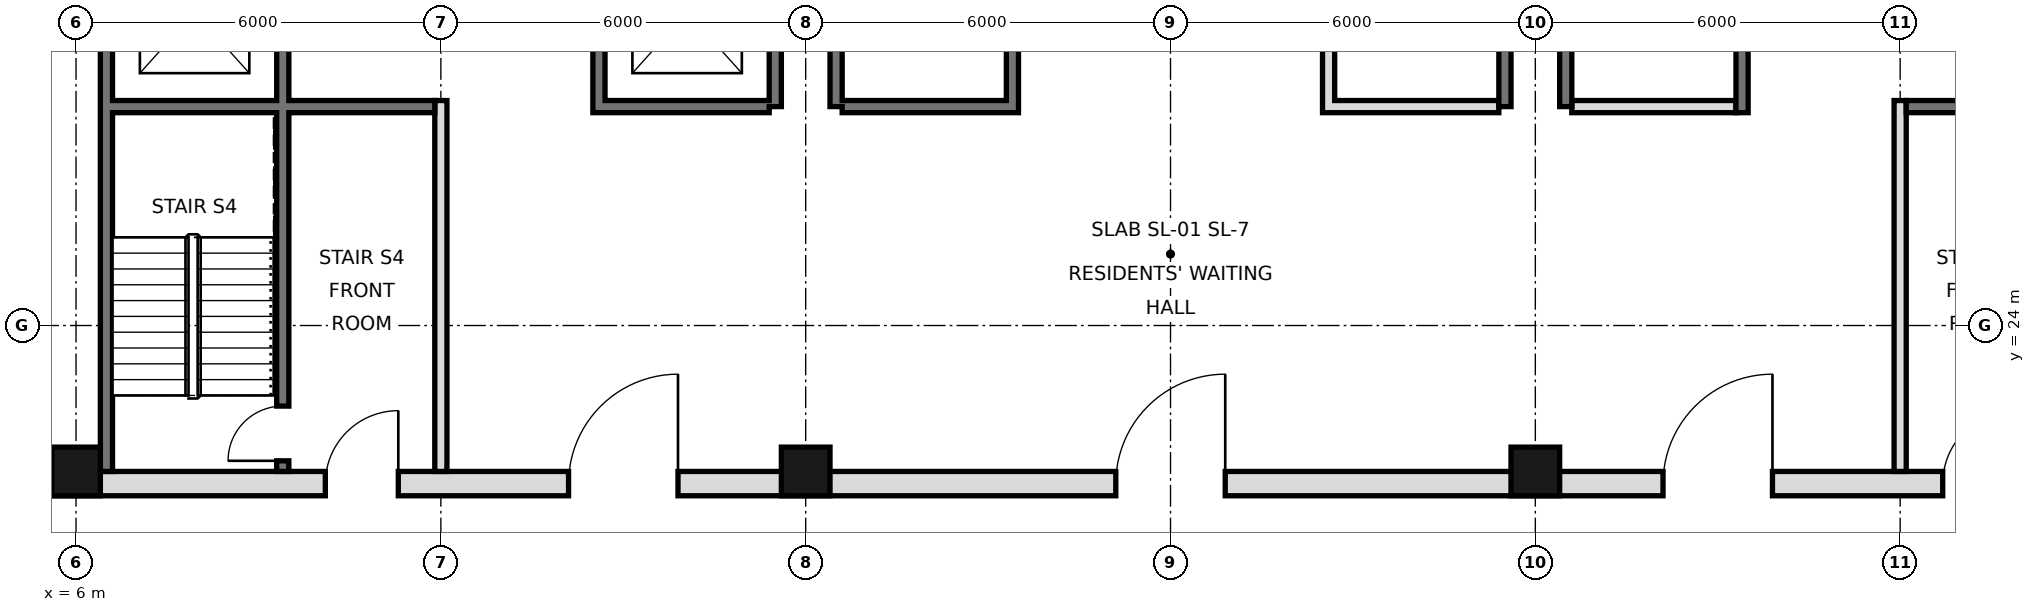
"""IFC4 building model, lengths in metres.
Left out: names, types, materials, properties, quantities, classifications, styles, units other than length and angle.
Written with IfcOpenShell. Run it as: python <this file> out.ifc"""

import sys

from ifc_helpers import new_model, si_unit, direction, frame, frame_2d, origin, origin_2d, place, context, subcontext, project, spatial, rectangle, hollow_rectangle, extrude, element, fill, save


model = new_model("IFC4")
c1 = context("Model", 3, precision=1e-05, world=origin(), true_north=direction((0.0, 1.0)))
c2 = subcontext(c1, "Body", "Model", "MODEL_VIEW")
j1 = project(units=[si_unit("LENGTHUNIT", "METRE"), si_unit("PLANEANGLEUNIT", "RADIAN")], contexts=[c1])
p1 = place(None, origin())
s1 = spatial("IfcSite", under=j1, at=p1, CompositionType="ELEMENT")
p2 = place(p1, origin())
s2 = spatial("IfcBuilding", under=s1, at=p2, CompositionType="ELEMENT")
p3 = place(p2, frame((0.0, 0.0, 82.2)))
s3 = spatial("IfcBuildingStorey", under=s2, at=p3, CompositionType="ELEMENT", Elevation=82.2)
for number, where, z_axis, x_axis in (
    (1, (6.0, 21.6, 0.0), (0.0, 0.0, 1.0), (1.0, 0.0, 0.0)),
    (2, (18.0, 21.6, 0.0), (0.0, 0.0, 1.0), (1.0, 0.0, 0.0)),
    (3, (30.0, 21.6, 0.0), (0.0, 0.0, 1.0), (1.0, 0.0, 0.0)),
):
    element("IfcColumn", number, at=place(p3, frame(where, z_axis=z_axis, x_axis=x_axis)), inside=s3, PredefinedType="COLUMN", context=c2, shape_type="SweptSolid", body=[
        extrude(hollow_rectangle(XDim=0.8, YDim=0.8, WallThickness=0.06, at=origin_2d()), origin(), (0.0, 0.0, 1.0), 3.6),
    ])
p4 = place(p3, frame((6.5, 21.6, 0.0), z_axis=(0.0, 0.0, 1.0), x_axis=(0.0, 1.0, 0.0)))
e4 = element("IfcWall", 4, at=p4, inside=s3, PredefinedType="SOLIDWALL", context=c2, shape_type="SweptSolid", body=[
    extrude(rectangle(XDim=23.5, YDim=0.2, at=frame_2d((11.75, 0.0))), origin(), (0.0, 0.0, 1.0), 3.42),
])
for number, where, z_axis, x_axis in (
    (5, (17.5, 27.6, 0.0), (0.0, 0.0, 1.0), (0.0, 1.0, 0.0)),
    (6, (18.5, 27.6, 0.0), (0.0, 0.0, 1.0), (0.0, 1.0, 0.0)),
    (7, (29.5, 27.6, 0.0), (0.0, 0.0, 1.0), (0.0, 1.0, 0.0)),
    (8, (30.5, 27.6, 0.0), (0.0, 0.0, 1.0), (0.0, 1.0, 0.0)),
):
    element("IfcWall", number, at=place(p3, frame(where, z_axis=z_axis, x_axis=x_axis)), inside=s3, PredefinedType="SOLIDWALL", context=c2, shape_type="SweptSolid", body=[
        extrude(rectangle(XDim=17.5, YDim=0.2, at=frame_2d((8.75, 0.0))), origin(), (0.0, 0.0, 1.0), 3.42),
    ])
p5 = place(p3, frame((5.6, 21.4, 0.0), z_axis=(0.0, 0.0, 1.0), x_axis=(1.0, 0.0, 0.0)))
e9 = element("IfcWall", 9, at=p5, inside=s3, PredefinedType="SOLIDWALL", context=c2, shape_type="SweptSolid", body=[
    extrude(rectangle(XDim=36.8, YDim=0.4, at=frame_2d((18.4, 0.0))), origin(), (0.0, 0.0, 1.0), 3.42),
])
p6 = place(p5, frame((8.5, 0.0, 0.0)))
e10 = element("IfcOpeningElement", 10, at=p6, cuts=e9, PredefinedType="OPENING", context=c2, shape_type="SweptSolid", body=[
    extrude(rectangle(XDim=1.8, YDim=2.1, at=frame_2d((0.9, 1.05))), frame((0.0, 0.21, 0.0), z_axis=(0.0, -1.0, 0.0), x_axis=(1.0, 0.0, 0.0)), (0.0, 0.0, 1.0), 0.42),
])
p7 = place(p5, frame((17.5, 0.0, 0.0)))
e11 = element("IfcOpeningElement", 11, at=p7, cuts=e9, PredefinedType="OPENING", context=c2, shape_type="SweptSolid", body=[
    extrude(rectangle(XDim=1.8, YDim=2.1, at=frame_2d((0.9, 1.05))), frame((0.0, 0.21, 0.0), z_axis=(0.0, -1.0, 0.0), x_axis=(1.0, 0.0, 0.0)), (0.0, 0.0, 1.0), 0.42),
])
p8 = place(p5, frame((26.5, 0.0, 0.0)))
e12 = element("IfcOpeningElement", 12, at=p8, cuts=e9, PredefinedType="OPENING", context=c2, shape_type="SweptSolid", body=[
    extrude(rectangle(XDim=1.8, YDim=2.1, at=frame_2d((0.9, 1.05))), frame((0.0, 0.21, 0.0), z_axis=(0.0, -1.0, 0.0), x_axis=(1.0, 0.0, 0.0)), (0.0, 0.0, 1.0), 0.42),
])
p9 = place(p5, frame((4.5, 0.0, 0.0)))
e13 = element("IfcOpeningElement", 13, at=p9, cuts=e9, PredefinedType="OPENING", context=c2, shape_type="SweptSolid", body=[
    extrude(rectangle(XDim=1.2, YDim=2.1, at=frame_2d((0.6, 1.05))), frame((0.0, 0.21, 0.0), z_axis=(0.0, -1.0, 0.0), x_axis=(1.0, 0.0, 0.0)), (0.0, 0.0, 1.0), 0.42),
])
p10 = place(p5, frame((31.1, 0.0, 0.0)))
e14 = element("IfcOpeningElement", 14, at=p10, cuts=e9, PredefinedType="OPENING", context=c2, shape_type="SweptSolid", body=[
    extrude(rectangle(XDim=1.2, YDim=2.1, at=frame_2d((0.6, 1.05))), frame((0.0, 0.21, 0.0), z_axis=(0.0, -1.0, 0.0), x_axis=(1.0, 0.0, 0.0)), (0.0, 0.0, 1.0), 0.42),
])
p11 = place(p3, frame((12.0, 21.6, 0.0), z_axis=(0.0, 0.0, 1.0), x_axis=(0.0, 1.0, 0.0)))
e15 = element("IfcWall", 15, at=p11, inside=s3, PredefinedType="PARTITIONING", context=c2, shape_type="SweptSolid", body=[
    extrude(rectangle(XDim=6.1, YDim=0.2, at=frame_2d((3.05, 0.0))), origin(), (0.0, 0.0, 1.0), 3.42),
])
p12 = place(p3, frame((14.6, 27.5, 0.0), z_axis=(0.0, 0.0, 1.0), x_axis=(0.0, 1.0, 0.0)))
e16 = element("IfcWall", 16, at=p12, inside=s3, PredefinedType="SOLIDWALL", context=c2, shape_type="SweptSolid", body=[
    extrude(rectangle(XDim=17.5, YDim=0.2, at=frame_2d((8.75, 0.0))), origin(), (0.0, 0.0, 1.0), 3.42),
])
p13 = place(p12, frame((1.1, 0.0, 0.0)))
e17 = element("IfcOpeningElement", 17, at=p13, cuts=e16, PredefinedType="OPENING", context=c2, shape_type="SweptSolid", body=[
    extrude(rectangle(XDim=1.1, YDim=2.1, at=frame_2d((0.55, 1.05))), frame((0.0, 0.11, 0.0), z_axis=(0.0, -1.0, 0.0), x_axis=(1.0, 0.0, 0.0)), (0.0, 0.0, 1.0), 0.22),
])
p14 = place(p12, frame((4.2, 0.0, 0.0)))
e18 = element("IfcOpeningElement", 18, at=p14, cuts=e16, PredefinedType="OPENING", context=c2, shape_type="SweptSolid", body=[
    extrude(rectangle(XDim=1.1, YDim=2.1, at=frame_2d((0.55, 1.05))), frame((0.0, 0.11, 0.0), z_axis=(0.0, -1.0, 0.0), x_axis=(1.0, 0.0, 0.0)), (0.0, 0.0, 1.0), 0.22),
])
p15 = place(p12, frame((15.4, 0.0, 0.0)))
e19 = element("IfcOpeningElement", 19, at=p15, cuts=e16, PredefinedType="OPENING", context=c2, shape_type="SweptSolid", body=[
    extrude(rectangle(XDim=1.1, YDim=2.1, at=frame_2d((0.55, 1.05))), frame((0.0, 0.11, 0.0), z_axis=(0.0, -1.0, 0.0), x_axis=(1.0, 0.0, 0.0)), (0.0, 0.0, 1.0), 0.22),
])
p16 = place(p12, frame((9.9, 0.0, 0.0)))
e20 = element("IfcOpeningElement", 20, at=p16, cuts=e16, PredefinedType="OPENING", context=c2, shape_type="SweptSolid", body=[
    extrude(rectangle(XDim=0.9, YDim=2.1, at=frame_2d((0.45, 1.05))), frame((0.0, 0.11, 0.0), z_axis=(0.0, -1.0, 0.0), x_axis=(1.0, 0.0, 0.0)), (0.0, 0.0, 1.0), 0.22),
])
p17 = place(p3, frame((21.4, 27.5, 0.0), z_axis=(0.0, 0.0, 1.0), x_axis=(0.0, 1.0, 0.0)))
e21 = element("IfcWall", 21, at=p17, inside=s3, PredefinedType="SOLIDWALL", context=c2, shape_type="SweptSolid", body=[
    extrude(rectangle(XDim=17.5, YDim=0.2, at=frame_2d((8.75, 0.0))), origin(), (0.0, 0.0, 1.0), 3.42),
])
p18 = place(p17, frame((9.8, 0.0, 0.0)))
e22 = element("IfcOpeningElement", 22, at=p18, cuts=e21, PredefinedType="OPENING", context=c2, shape_type="SweptSolid", body=[
    extrude(rectangle(XDim=1.0, YDim=2.1, at=frame_2d((0.5, 1.05))), frame((0.0, 0.11, 0.0), z_axis=(0.0, -1.0, 0.0), x_axis=(1.0, 0.0, 0.0)), (0.0, 0.0, 1.0), 0.22),
])
p19 = place(p17, frame((7.4, 0.0, 0.0)))
e23 = element("IfcOpeningElement", 23, at=p19, cuts=e21, PredefinedType="OPENING", context=c2, shape_type="SweptSolid", body=[
    extrude(rectangle(XDim=0.9, YDim=2.1, at=frame_2d((0.45, 1.05))), frame((0.0, 0.11, 0.0), z_axis=(0.0, -1.0, 0.0), x_axis=(1.0, 0.0, 0.0)), (0.0, 0.0, 1.0), 0.22),
])
p20 = place(p3, frame((26.6, 27.5, 0.0), z_axis=(0.0, 0.0, 1.0), x_axis=(0.0, 1.0, 0.0)))
e24 = element("IfcWall", 24, at=p20, inside=s3, PredefinedType="SOLIDWALL", context=c2, shape_type="SweptSolid", body=[
    extrude(rectangle(XDim=17.5, YDim=0.2, at=frame_2d((8.75, 0.0))), origin(), (0.0, 0.0, 1.0), 3.42),
])
p21 = place(p20, frame((4.3, 0.0, 0.0)))
e25 = element("IfcOpeningElement", 25, at=p21, cuts=e24, PredefinedType="OPENING", context=c2, shape_type="SweptSolid", body=[
    extrude(rectangle(XDim=0.9, YDim=2.1, at=frame_2d((0.45, 1.05))), frame((0.0, 0.11, 0.0), z_axis=(0.0, -1.0, 0.0), x_axis=(1.0, 0.0, 0.0)), (0.0, 0.0, 1.0), 0.22),
])
p22 = place(p20, frame((10.35, 0.0, 0.0)))
e26 = element("IfcOpeningElement", 26, at=p22, cuts=e24, PredefinedType="OPENING", context=c2, shape_type="SweptSolid", body=[
    extrude(rectangle(XDim=1.0, YDim=2.1, at=frame_2d((0.5, 1.05))), frame((0.0, 0.11, 0.0), z_axis=(0.0, -1.0, 0.0), x_axis=(1.0, 0.0, 0.0)), (0.0, 0.0, 1.0), 0.22),
])
p23 = place(p20, frame((14.575, 0.0, 0.0)))
e27 = element("IfcOpeningElement", 27, at=p23, cuts=e24, PredefinedType="OPENING", context=c2, shape_type="SweptSolid", body=[
    extrude(rectangle(XDim=1.0, YDim=2.1, at=frame_2d((0.5, 1.05))), frame((0.0, 0.11, 0.0), z_axis=(0.0, -1.0, 0.0), x_axis=(1.0, 0.0, 0.0)), (0.0, 0.0, 1.0), 0.22),
])
p24 = place(p3, frame((33.4, 27.5, 0.0), z_axis=(0.0, 0.0, 1.0), x_axis=(0.0, 1.0, 0.0)))
e28 = element("IfcWall", 28, at=p24, inside=s3, PredefinedType="SOLIDWALL", context=c2, shape_type="SweptSolid", body=[
    extrude(rectangle(XDim=17.5, YDim=0.2, at=frame_2d((8.75, 0.0))), origin(), (0.0, 0.0, 1.0), 3.42),
])
p25 = place(p24, frame((15.4, 0.0, 0.0)))
e29 = element("IfcOpeningElement", 29, at=p25, cuts=e28, PredefinedType="OPENING", context=c2, shape_type="SweptSolid", body=[
    extrude(rectangle(XDim=1.1, YDim=2.1, at=frame_2d((0.55, 1.05))), frame((0.0, 0.11, 0.0), z_axis=(0.0, -1.0, 0.0), x_axis=(1.0, 0.0, 0.0)), (0.0, 0.0, 1.0), 0.22),
])
p26 = place(p24, frame((2.7, 0.0, 0.0)))
e30 = element("IfcOpeningElement", 30, at=p26, cuts=e28, PredefinedType="OPENING", context=c2, shape_type="SweptSolid", body=[
    extrude(rectangle(XDim=1.0, YDim=2.1, at=frame_2d((0.5, 1.05))), frame((0.0, 0.11, 0.0), z_axis=(0.0, -1.0, 0.0), x_axis=(1.0, 0.0, 0.0)), (0.0, 0.0, 1.0), 0.22),
])
p27 = place(p24, frame((9.9, 0.0, 0.0)))
e31 = element("IfcOpeningElement", 31, at=p27, cuts=e28, PredefinedType="OPENING", context=c2, shape_type="SweptSolid", body=[
    extrude(rectangle(XDim=0.9, YDim=2.1, at=frame_2d((0.45, 1.05))), frame((0.0, 0.11, 0.0), z_axis=(0.0, -1.0, 0.0), x_axis=(1.0, 0.0, 0.0)), (0.0, 0.0, 1.0), 0.22),
])
p28 = place(p3, frame((36.0, 21.6, 0.0), z_axis=(0.0, 0.0, 1.0), x_axis=(0.0, 1.0, 0.0)))
e32 = element("IfcWall", 32, at=p28, inside=s3, PredefinedType="PARTITIONING", context=c2, shape_type="SweptSolid", body=[
    extrude(rectangle(XDim=6.1, YDim=0.2, at=frame_2d((3.05, 0.0))), origin(), (0.0, 0.0, 1.0), 3.42),
])
p29 = place(p3, frame((9.4, 21.6, 0.0), z_axis=(0.0, 0.0, 1.0), x_axis=(0.0, 1.0, 0.0)))
e33 = element("IfcWall", 33, at=p29, inside=s3, PredefinedType="SOLIDWALL", context=c2, shape_type="SweptSolid", body=[
    extrude(rectangle(XDim=23.4, YDim=0.2, at=frame_2d((11.7, 0.0))), origin(), (0.0, 0.0, 1.0), 3.42),
])
p30 = place(p29, frame((7.0, 0.0, 0.0)))
e34 = element("IfcOpeningElement", 34, at=p30, cuts=e33, PredefinedType="OPENING", context=c2, shape_type="SweptSolid", body=[
    extrude(rectangle(XDim=1.1, YDim=2.1, at=frame_2d((0.55, 1.05))), frame((0.0, 0.11, 0.0), z_axis=(0.0, -1.0, 0.0), x_axis=(1.0, 0.0, 0.0)), (0.0, 0.0, 1.0), 0.22),
])
p31 = place(p29, frame((10.1, 0.0, 0.0)))
e35 = element("IfcOpeningElement", 35, at=p31, cuts=e33, PredefinedType="OPENING", context=c2, shape_type="SweptSolid", body=[
    extrude(rectangle(XDim=1.1, YDim=2.1, at=frame_2d((0.55, 1.05))), frame((0.0, 0.11, 0.0), z_axis=(0.0, -1.0, 0.0), x_axis=(1.0, 0.0, 0.0)), (0.0, 0.0, 1.0), 0.22),
])
p32 = place(p29, frame((13.2, 0.0, 0.0)))
e36 = element("IfcOpeningElement", 36, at=p32, cuts=e33, PredefinedType="OPENING", context=c2, shape_type="SweptSolid", body=[
    extrude(rectangle(XDim=1.1, YDim=2.1, at=frame_2d((0.55, 1.05))), frame((0.0, 0.11, 0.0), z_axis=(0.0, -1.0, 0.0), x_axis=(1.0, 0.0, 0.0)), (0.0, 0.0, 1.0), 0.22),
])
p33 = place(p29, frame((15.7, 0.0, 0.0)))
e37 = element("IfcOpeningElement", 37, at=p33, cuts=e33, PredefinedType="OPENING", context=c2, shape_type="SweptSolid", body=[
    extrude(rectangle(XDim=1.0, YDim=2.1, at=frame_2d((0.5, 1.05))), frame((0.0, 0.11, 0.0), z_axis=(0.0, -1.0, 0.0), x_axis=(1.0, 0.0, 0.0)), (0.0, 0.0, 1.0), 0.22),
])
p34 = place(p29, frame((0.175, 0.0, 0.0)))
e38 = element("IfcOpeningElement", 38, at=p34, cuts=e33, PredefinedType="OPENING", context=c2, shape_type="SweptSolid", body=[
    extrude(rectangle(XDim=0.9, YDim=2.1, at=frame_2d((0.45, 1.05))), frame((0.0, 0.11, 0.0), z_axis=(0.0, -1.0, 0.0), x_axis=(1.0, 0.0, 0.0)), (0.0, 0.0, 1.0), 0.22),
])
for number, where, z_axis, x_axis in (
    (39, (14.7, 27.6, 0.0), (0.0, 0.0, 1.0), (1.0, 0.0, 0.0)),
    (40, (18.6, 27.6, 0.0), (0.0, 0.0, 1.0), (1.0, 0.0, 0.0)),
    (41, (26.7, 27.6, 0.0), (0.0, 0.0, 1.0), (1.0, 0.0, 0.0)),
):
    element("IfcWall", number, at=place(p3, frame(where, z_axis=z_axis, x_axis=x_axis)), inside=s3, PredefinedType="SOLIDWALL", context=c2, shape_type="SweptSolid", body=[
        extrude(rectangle(XDim=2.7, YDim=0.2, at=frame_2d((1.35, 0.0))), origin(), (0.0, 0.0, 1.0), 3.42),
    ])
p35 = place(p3, frame((30.6, 27.6, 0.0), z_axis=(0.0, 0.0, 1.0), x_axis=(1.0, 0.0, 0.0)))
e42 = element("IfcWall", 42, at=p35, inside=s3, PredefinedType="PARTITIONING", context=c2, shape_type="SweptSolid", body=[
    extrude(rectangle(XDim=2.7, YDim=0.2, at=frame_2d((1.35, 0.0))), origin(), (0.0, 0.0, 1.0), 3.42),
])
for number, where, z_axis, x_axis in (
    (43, (36.1, 27.6, 0.0), (0.0, 0.0, 1.0), (1.0, 0.0, 0.0)),
    (44, (6.6, 27.6, 0.0), (0.0, 0.0, 1.0), (1.0, 0.0, 0.0)),
):
    element("IfcWall", number, at=place(p3, frame(where, z_axis=z_axis, x_axis=x_axis)), inside=s3, PredefinedType="SOLIDWALL", context=c2, shape_type="SweptSolid", body=[
        extrude(rectangle(XDim=5.3, YDim=0.2, at=frame_2d((2.65, 0.0))), origin(), (0.0, 0.0, 1.0), 3.42),
    ])
p36 = place(p6, frame((1.8, 0.0, 0.0), z_axis=(0.0, 0.0, 1.0), x_axis=(-1.0, 0.0, 0.0)))
e45 = element("IfcDoor", 45, at=p36, inside=s3, OperationType="SINGLE_SWING_LEFT", PredefinedType="DOOR", context=c2, shape_type="SweptSolid", body=[
    extrude(rectangle(XDim=1.8, YDim=2.1, at=frame_2d((0.9, 1.05))), frame((0.0, 0.025, 0.0), z_axis=(0.0, -1.0, 0.0), x_axis=(1.0, 0.0, 0.0)), (0.0, 0.0, 1.0), 0.05),
])
fill(e10, e45)
p37 = place(p7, frame((1.8, 0.0, 0.0), z_axis=(0.0, 0.0, 1.0), x_axis=(-1.0, 0.0, 0.0)))
e46 = element("IfcDoor", 46, at=p37, inside=s3, OperationType="SINGLE_SWING_LEFT", PredefinedType="DOOR", context=c2, shape_type="SweptSolid", body=[
    extrude(rectangle(XDim=1.8, YDim=2.1, at=frame_2d((0.9, 1.05))), frame((0.0, 0.025, 0.0), z_axis=(0.0, -1.0, 0.0), x_axis=(1.0, 0.0, 0.0)), (0.0, 0.0, 1.0), 0.05),
])
fill(e11, e46)
p38 = place(p8, frame((1.8, 0.0, 0.0), z_axis=(0.0, 0.0, 1.0), x_axis=(-1.0, 0.0, 0.0)))
e47 = element("IfcDoor", 47, at=p38, inside=s3, OperationType="SINGLE_SWING_LEFT", PredefinedType="DOOR", context=c2, shape_type="SweptSolid", body=[
    extrude(rectangle(XDim=1.8, YDim=2.1, at=frame_2d((0.9, 1.05))), frame((0.0, 0.025, 0.0), z_axis=(0.0, -1.0, 0.0), x_axis=(1.0, 0.0, 0.0)), (0.0, 0.0, 1.0), 0.05),
])
fill(e12, e47)
p39 = place(p9, frame((1.2, 0.0, 0.0), z_axis=(0.0, 0.0, 1.0), x_axis=(-1.0, 0.0, 0.0)))
e48 = element("IfcDoor", 48, at=p39, inside=s3, OperationType="SINGLE_SWING_LEFT", PredefinedType="DOOR", context=c2, shape_type="SweptSolid", body=[
    extrude(rectangle(XDim=1.2, YDim=2.1, at=frame_2d((0.6, 1.05))), frame((0.0, 0.025, 0.0), z_axis=(0.0, -1.0, 0.0), x_axis=(1.0, 0.0, 0.0)), (0.0, 0.0, 1.0), 0.05),
])
fill(e13, e48)
p40 = place(p10, frame((1.2, 0.0, 0.0), z_axis=(0.0, 0.0, 1.0), x_axis=(-1.0, 0.0, 0.0)))
e49 = element("IfcDoor", 49, at=p40, inside=s3, OperationType="SINGLE_SWING_LEFT", PredefinedType="DOOR", context=c2, shape_type="SweptSolid", body=[
    extrude(rectangle(XDim=1.2, YDim=2.1, at=frame_2d((0.6, 1.05))), frame((0.0, 0.025, 0.0), z_axis=(0.0, -1.0, 0.0), x_axis=(1.0, 0.0, 0.0)), (0.0, 0.0, 1.0), 0.05),
])
fill(e14, e49)
p41 = place(p34, origin())
e50 = element("IfcDoor", 50, at=p41, inside=s3, OperationType="SINGLE_SWING_LEFT", PredefinedType="DOOR", context=c2, shape_type="SweptSolid", body=[
    extrude(rectangle(XDim=0.9, YDim=2.1, at=frame_2d((0.45, 1.05))), frame((0.0, 0.025, 0.0), z_axis=(0.0, -1.0, 0.0), x_axis=(1.0, 0.0, 0.0)), (0.0, 0.0, 1.0), 0.05),
])
fill(e38, e50)
save(model, sys.argv[1])
